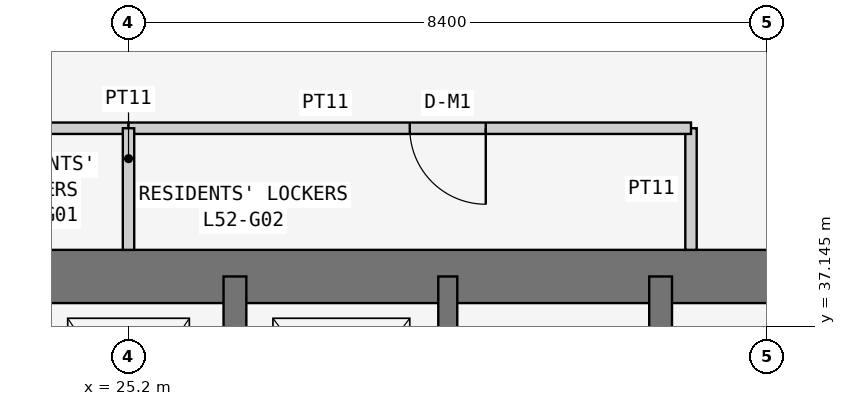
"""IFC4 building model, lengths in metres.
Left out: names, types, materials, properties, quantities, classifications, styles, units other than length and angle.
Written with IfcOpenShell. Run it as: python <this file> out.ifc"""

import sys

from ifc_helpers import new_model, si_unit, direction, frame, frame_2d, origin, place, context, subcontext, project, spatial, rectangle, extrude, element, fill, save


model = new_model("IFC4")
c1 = context("Model", 3, precision=1e-05, world=origin(), true_north=direction((0.0, 1.0)))
c2 = subcontext(c1, "Body", "Model", "MODEL_VIEW")
j1 = project(units=[si_unit("LENGTHUNIT", "METRE"), si_unit("PLANEANGLEUNIT", "RADIAN")], contexts=[c1])
p1 = place(None, origin())
s1 = spatial("IfcSite", under=j1, at=p1, CompositionType="ELEMENT")
p2 = place(p1, origin())
s2 = spatial("IfcBuilding", under=s1, at=p2, CompositionType="ELEMENT")
p3 = place(p2, frame((0.0, 0.0, 201.3)))
s3 = spatial("IfcBuildingStorey", under=s2, at=p3, CompositionType="ELEMENT", Elevation=201.3)
p4 = place(p3, frame((37.8, 37.8, 0.0), z_axis=(0.0, 0.0, 1.0), x_axis=(-1.0, 0.0, 0.0)))
e1 = element("IfcWall", 1, at=p4, inside=s3, PredefinedType="SHEAR", context=c2, shape_type="SweptSolid", body=[
    extrude(rectangle(XDim=17.15, YDim=0.7, at=frame_2d((8.575, 0.0))), origin(), (0.0, 0.0, 1.0), 3.6),
])
p5 = place(p3, frame((26.6, 21.0, 0.0), z_axis=(0.0, 0.0, 1.0), x_axis=(0.0, 1.0, 0.0)))
e2 = element("IfcWall", 2, at=p5, inside=s3, PredefinedType="SHEAR", context=c2, shape_type="SweptSolid", body=[
    extrude(rectangle(XDim=16.8, YDim=0.3, at=frame_2d((8.4, 0.0))), origin(), (0.0, 0.0, 1.0), 3.6),
])
p6 = place(p5, frame((10.4, 0.0, 0.0)))
e3 = element("IfcOpeningElement", 3, at=p6, cuts=e2, PredefinedType="OPENING", context=c2, shape_type="SweptSolid", body=[
    extrude(rectangle(XDim=1.2, YDim=2.1, at=frame_2d((0.6, 1.05))), frame((0.0, 0.16, 0.0), z_axis=(0.0, -1.0, 0.0), x_axis=(1.0, 0.0, 0.0)), (0.0, 0.0, 1.0), 0.32),
])
p7 = place(p3, frame((32.2, 29.25, 0.0), z_axis=(0.0, 0.0, 1.0), x_axis=(0.0, 1.0, 0.0)))
e4 = element("IfcWall", 4, at=p7, inside=s3, PredefinedType="SHEAR", context=c2, shape_type="SweptSolid", body=[
    extrude(rectangle(XDim=8.55, YDim=0.3, at=frame_2d((4.275, 0.0))), origin(), (0.0, 0.0, 1.0), 3.6),
])
p8 = place(p3, frame((29.4, 34.6, 0.0), z_axis=(0.0, 0.0, 1.0), x_axis=(0.0, 1.0, 0.0)))
e5 = element("IfcWall", 5, at=p8, inside=s3, PredefinedType="SHEAR", context=c2, shape_type="SweptSolid", body=[
    extrude(rectangle(XDim=3.2, YDim=0.25, at=frame_2d((1.6, 0.0))), origin(), (0.0, 0.0, 1.0), 3.6),
])
p9 = place(p3, frame((25.2, 39.75, 0.0), z_axis=(0.0, 0.0, 1.0), x_axis=(-1.0, 0.0, 0.0)))
e6 = element("IfcWall", 6, at=p9, inside=s3, PredefinedType="PARTITIONING", context=c2, shape_type="SweptSolid", body=[
    extrude(rectangle(XDim=4.55, YDim=0.15, at=frame_2d((2.275, 0.0))), origin(), (0.0, 0.0, 1.0), 3.45),
])
p10 = place(p9, frame((2.275, 0.0, 0.0)))
e7 = element("IfcOpeningElement", 7, at=p10, cuts=e6, PredefinedType="OPENING", context=c2, shape_type="SweptSolid", body=[
    extrude(rectangle(XDim=1.0, YDim=2.1, at=frame_2d((0.5, 1.05))), frame((0.0, 0.085, 0.0), z_axis=(0.0, -1.0, 0.0), x_axis=(1.0, 0.0, 0.0)), (0.0, 0.0, 1.0), 0.17),
])
p11 = place(p3, frame((32.6, 38.15, 0.0), z_axis=(0.0, 0.0, 1.0), x_axis=(0.0, 1.0, 0.0)))
e8 = element("IfcWall", 8, at=p11, inside=s3, PredefinedType="PARTITIONING", context=c2, shape_type="SweptSolid", body=[
    extrude(rectangle(XDim=1.6, YDim=0.15, at=frame_2d((0.8, 0.0))), origin(), (0.0, 0.0, 1.0), 3.45),
])
p12 = place(p3, frame((32.6, 39.75, 0.0), z_axis=(0.0, 0.0, 1.0), x_axis=(-1.0, 0.0, 0.0)))
e9 = element("IfcWall", 9, at=p12, inside=s3, PredefinedType="PARTITIONING", context=c2, shape_type="SweptSolid", body=[
    extrude(rectangle(XDim=7.4, YDim=0.15, at=frame_2d((3.7, 0.0))), origin(), (0.0, 0.0, 1.0), 3.45),
])
p13 = place(p12, frame((2.7, 0.0, 0.0)))
e10 = element("IfcOpeningElement", 10, at=p13, cuts=e9, PredefinedType="OPENING", context=c2, shape_type="SweptSolid", body=[
    extrude(rectangle(XDim=1.0, YDim=2.1, at=frame_2d((0.5, 1.05))), frame((0.0, 0.085, 0.0), z_axis=(0.0, -1.0, 0.0), x_axis=(1.0, 0.0, 0.0)), (0.0, 0.0, 1.0), 0.17),
])
p14 = place(p3, frame((25.2, 38.15, 0.0), z_axis=(0.0, 0.0, 1.0), x_axis=(0.0, 1.0, 0.0)))
e11 = element("IfcWall", 11, at=p14, inside=s3, PredefinedType="PARTITIONING", context=c2, shape_type="SweptSolid", body=[
    extrude(rectangle(XDim=1.6, YDim=0.15, at=frame_2d((0.8, 0.0))), origin(), (0.0, 0.0, 1.0), 2.767),
])
p15 = place(p13, origin())
e12 = element("IfcDoor", 12, at=p15, inside=s3, OperationType="SINGLE_SWING_LEFT", PredefinedType="DOOR", context=c2, shape_type="SweptSolid", body=[
    extrude(rectangle(XDim=1.0, YDim=2.1, at=frame_2d((0.5, 1.05))), frame((0.0, 0.025, 0.0), z_axis=(0.0, -1.0, 0.0), x_axis=(1.0, 0.0, 0.0)), (0.0, 0.0, 1.0), 0.05),
])
fill(e10, e12)
save(model, sys.argv[1])
